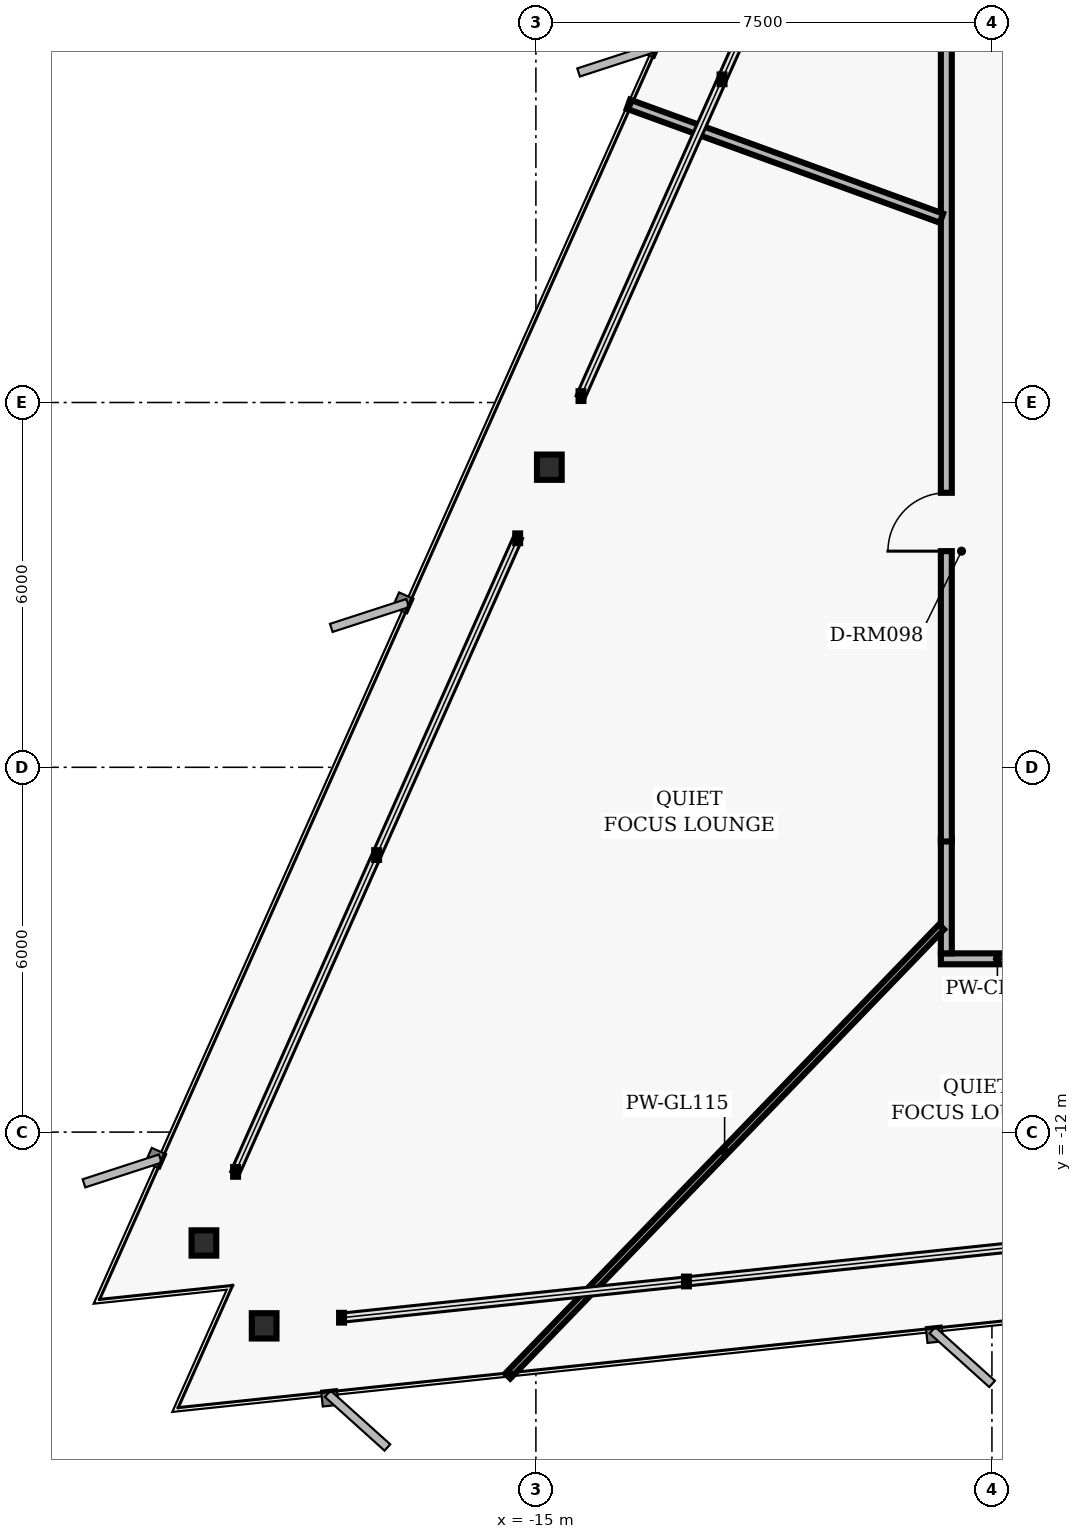
"""IFC4 building model, lengths in metres.
Left out: names, types, materials, properties, quantities, classifications, styles, units other than length and angle.
Written with IfcOpenShell. Run it as: python <this file> out.ifc"""

import sys

from ifc_helpers import new_model, si_unit, direction, frame, frame_2d, origin, origin_2d, place, context, subcontext, project, spatial, rectangle, i_section, extrude, element, fill, save


model = new_model("IFC4")
c1 = context("Model", 3, precision=1e-05, world=origin(), true_north=direction((0.0, 1.0)))
c2 = subcontext(c1, "Body", "Model", "MODEL_VIEW")
j1 = project(units=[si_unit("LENGTHUNIT", "METRE"), si_unit("PLANEANGLEUNIT", "RADIAN")], contexts=[c1])
p1 = place(None, origin())
s1 = spatial("IfcSite", under=j1, at=p1, CompositionType="ELEMENT")
p2 = place(p1, origin())
s2 = spatial("IfcBuilding", under=s1, at=p2, CompositionType="ELEMENT")
p3 = place(p2, frame((0.0, 0.0, 122.88)))
s3 = spatial("IfcBuildingStorey", under=s2, at=p3, CompositionType="ELEMENT", Elevation=122.88)
for number, where, z_axis, x_axis in (
    (1, (-14.779, -1.064, 0.0), (0.0, 0.0, 1.0), (1.0, 0.0, 0.0)),
    (2, (-20.46, -13.823, 0.0), (0.0, 0.0, 1.0), (1.0, 0.0, 0.0)),
    (3, (-19.469, -15.187, 0.0), (0.0, 0.0, 1.0), (1.0, 0.0, 0.0)),
):
    element("IfcColumn", number, at=place(p3, frame(where, z_axis=z_axis, x_axis=x_axis)), inside=s3, PredefinedType="COLUMN", context=c2, shape_type="SweptSolid", body=[
        extrude(i_section(OverallWidth=0.406, OverallDepth=0.416, WebThickness=0.03, FlangeThickness=0.048, FilletRadius=0.02, at=origin_2d()), origin(), (0.0, 0.0, 1.0), 3.04),
    ])
p4 = place(p3, frame((-6.48, -9.15, 0.0), z_axis=(0.0, 0.0, 1.0), x_axis=(-1.0, 0.0, 0.0)))
e4 = element("IfcWall", 4, at=p4, inside=s3, PredefinedType="PARTITIONING", context=c2, shape_type="SweptSolid", body=[
    extrude(rectangle(XDim=1.86, YDim=0.18, at=frame_2d((0.93, 0.0))), origin(), (0.0, 0.0, 1.0), 2.16),
])
p5 = place(p3, frame((-8.25, -9.06, 0.0), z_axis=(0.0, 0.0, 1.0), x_axis=(0.0, 1.0, 0.0)))
e5 = element("IfcWall", 5, at=p5, inside=s3, PredefinedType="PARTITIONING", context=c2, shape_type="SweptSolid", body=[
    extrude(rectangle(XDim=1.88, YDim=0.18, at=frame_2d((0.94, 0.0))), origin(), (0.0, 0.0, 1.0), 2.593),
])
p6 = place(p3, frame((-8.25, -7.22, 0.0), z_axis=(0.0, 0.0, 1.0), x_axis=(0.0, 1.0, 0.0)))
e6 = element("IfcWall", 6, at=p6, inside=s3, PredefinedType="PARTITIONING", context=c2, shape_type="SweptSolid", body=[
    extrude(rectangle(XDim=14.44, YDim=0.18, at=frame_2d((7.22, 0.0))), origin(), (0.0, 0.0, 1.0), 2.16),
])
p7 = place(p6, frame((4.775, 0.0, 0.0)))
e7 = element("IfcOpeningElement", 7, at=p7, cuts=e6, PredefinedType="OPENING", context=c2, shape_type="SweptSolid", body=[
    extrude(rectangle(XDim=0.96, YDim=2.02, at=frame_2d((0.48, 1.01))), frame((0.0, 0.1, 0.0), z_axis=(0.0, -1.0, 0.0), x_axis=(1.0, 0.0, 0.0)), (0.0, 0.0, 1.0), 0.2),
])
p8 = place(p3, frame((-8.33, -8.626, 0.0), z_axis=(0.0, 0.0, 1.0), x_axis=(-0.694659007852, -0.719339184815, 0.0)))
e8 = element("IfcWall", 8, at=p8, inside=s3, PredefinedType="MOVABLE", context=c2, shape_type="SweptSolid", body=[
    extrude(rectangle(XDim=10.268, YDim=0.115, at=frame_2d((5.134, 0.0))), origin(), (0.0, 0.0, 1.0), 2.593),
])
p9 = place(p3, frame((-8.33, 3.032, 0.0), z_axis=(0.0, 0.0, 1.0), x_axis=(-0.939693198397, 0.342018556347, 0.0)))
e9 = element("IfcWall", 9, at=p9, inside=s3, PredefinedType="PARTITIONING", context=c2, shape_type="SweptSolid", body=[
    extrude(rectangle(XDim=5.479, YDim=0.16, at=frame_2d((2.739, 0.0))), origin(), (0.0, 0.0, 1.0), 2.593),
])
p10 = place(p7, origin())
e10 = element("IfcDoor", 10, at=p10, inside=s3, OperationType="SINGLE_SWING_LEFT", PredefinedType="DOOR", context=c2, shape_type="SweptSolid", body=[
    extrude(rectangle(XDim=0.96, YDim=2.02, at=frame_2d((0.48, 1.01))), frame((0.0, 0.025, 0.0), z_axis=(0.0, -1.0, 0.0), x_axis=(1.0, 0.0, 0.0)), (0.0, 0.0, 1.0), 0.05),
])
fill(e7, e10)
save(model, sys.argv[1])
